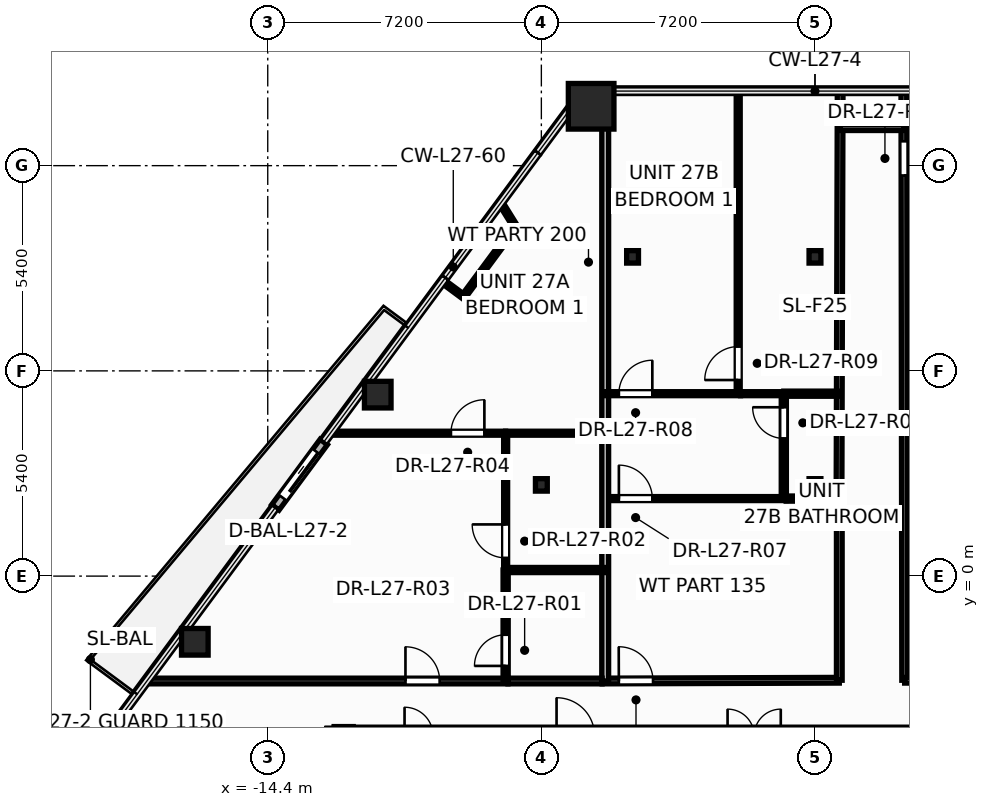
"""IFC4 building model, lengths in metres.
Left out: names, types, materials, properties, quantities, classifications, styles, units other than length and angle.
Written with IfcOpenShell. Run it as: python <this file> out.ifc"""

import sys

from ifc_helpers import new_model, si_unit, direction, frame, frame_2d, origin, origin_2d, place, context, subcontext, project, spatial, rectangle, hollow_rectangle, hollow_circle, i_section, extrude, element, fill, save


model = new_model("IFC4")
c1 = context("Model", 3, precision=1e-05, world=origin(), true_north=direction((0.0, 1.0)))
c2 = subcontext(c1, "Body", "Model", "MODEL_VIEW")
j1 = project(units=[si_unit("LENGTHUNIT", "METRE"), si_unit("PLANEANGLEUNIT", "RADIAN")], contexts=[c1])
p1 = place(None, origin())
s1 = spatial("IfcSite", under=j1, at=p1, CompositionType="ELEMENT")
p2 = place(p1, origin())
s2 = spatial("IfcBuilding", under=s1, at=p2, CompositionType="ELEMENT")
p3 = place(p2, frame((0.0, 0.0, 106.8)))
s3 = spatial("IfcBuildingStorey", under=s2, at=p3, CompositionType="ELEMENT", Elevation=106.8)
p4 = place(p3, frame((-5.89, 12.362, 0.0), z_axis=(0.0, 0.0, 1.0), x_axis=(1.0, 0.0, 0.0)))
e1 = element("IfcColumn", 1, at=p4, inside=s3, PredefinedType="COLUMN", context=c2, shape_type="SweptSolid", body=[
    extrude(hollow_rectangle(XDim=1.2, YDim=1.2, WallThickness=0.055, at=origin_2d()), origin(), (0.0, 0.0, 1.0), 3.6),
])
for number, where, z_axis, x_axis in (
    (2, (-11.506, 4.775, 0.0), (0.0, 0.0, 1.0), (1.0, 0.0, 0.0)),
    (3, (-16.319, -1.729, 0.0), (0.0, 0.0, 1.0), (1.0, 0.0, 0.0)),
):
    element("IfcColumn", number, at=place(p3, frame(where, z_axis=z_axis, x_axis=x_axis)), inside=s3, PredefinedType="COLUMN", context=c2, shape_type="SweptSolid", body=[
        extrude(hollow_circle(Radius=0.35, WallThickness=0.03, at=origin_2d()), origin(), (0.0, 0.0, 1.0), 3.6),
    ])
p5 = place(p3, frame((-12.4, -4.2, 0.0), z_axis=(0.0, 0.0, 1.0), x_axis=(1.0, 0.0, 0.0)))
e4 = element("IfcColumn", 4, at=p5, inside=s3, PredefinedType="COLUMN", context=c2, shape_type="SweptSolid", body=[
    extrude(i_section(OverallWidth=0.5, OverallDepth=0.482, WebThickness=0.04, FlangeThickness=0.045, at=origin_2d()), origin(), (0.0, 0.0, 1.0), 3.6),
])
for number, where, z_axis, x_axis in (
    (5, (-7.2, 2.4, 0.0), (0.0, 0.0, 1.0), (1.0, 0.0, 0.0)),
    (6, (0.0, 2.4, 0.0), (0.0, 0.0, 1.0), (1.0, 0.0, 0.0)),
    (7, (-4.8, 8.4, 0.0), (0.0, 0.0, 1.0), (1.0, 0.0, 0.0)),
    (8, (0.0, 8.4, 0.0), (0.0, 0.0, 1.0), (1.0, 0.0, 0.0)),
):
    element("IfcColumn", number, at=place(p3, frame(where, z_axis=z_axis, x_axis=x_axis)), inside=s3, PredefinedType="COLUMN", context=c2, shape_type="SweptSolid", body=[
        extrude(i_section(OverallWidth=0.311, OverallDepth=0.327, WebThickness=0.016, FlangeThickness=0.025, at=origin_2d()), origin(), (0.0, 0.0, 1.0), 3.6),
    ])
p6 = place(p3, frame((-12.926, 3.528, -0.015), z_axis=(0.0, 0.0, 1.0), x_axis=(-0.594840056707, -0.803844081235, 0.0)))
e9 = element("IfcWall", 9, at=p6, inside=s3, PredefinedType="STANDARD", context=c2, shape_type="SweptSolid", body=[
    extrude(rectangle(XDim=2.14, YDim=0.24, at=frame_2d((1.07, 0.0))), origin(), (0.0, 0.0, 1.0), 2.729),
])
p7 = place(p6, frame((0.32, 0.0, 0.015)))
e10 = element("IfcOpeningElement", 10, at=p7, cuts=e9, PredefinedType="OPENING", context=c2, shape_type="SweptSolid", body=[
    extrude(rectangle(XDim=1.506, YDim=2.204, at=frame_2d((0.75, 1.102))), frame((0.0, 0.13, 0.0), z_axis=(0.0, -1.0, 0.0), x_axis=(1.0, 0.0, 0.0)), (0.0, 0.0, 1.0), 0.26),
])
p8 = place(p3, frame((-12.65, -4.2, 0.0), z_axis=(0.0, 0.0, 1.0), x_axis=(1.0, 0.0, 0.0)))
e11 = element("IfcWall", 11, at=p8, inside=s3, PredefinedType="SHEAR", context=c2, shape_type="SweptSolid", body=[
    extrude(rectangle(XDim=25.3, YDim=0.45, at=frame_2d((12.65, 0.0))), origin(), (0.0, 0.0, 1.0), 3.6),
])
p9 = place(p8, frame((1.85, 0.0, 0.0)))
e12 = element("IfcOpeningElement", 12, at=p9, cuts=e11, PredefinedType="OPENING", context=c2, shape_type="SweptSolid", body=[
    extrude(rectangle(XDim=0.756, YDim=2.054, at=frame_2d((0.375, 1.027))), frame((0.0, 0.235, 0.0), z_axis=(0.0, -1.0, 0.0), x_axis=(1.0, 0.0, 0.0)), (0.0, 0.0, 1.0), 0.47),
])
p10 = place(p8, frame((22.65, 0.0, 0.0)))
e13 = element("IfcOpeningElement", 13, at=p10, cuts=e11, PredefinedType="OPENING", context=c2, shape_type="SweptSolid", body=[
    extrude(rectangle(XDim=0.756, YDim=2.054, at=frame_2d((0.375, 1.027))), frame((0.0, 0.235, 0.0), z_axis=(0.0, -1.0, 0.0), x_axis=(1.0, 0.0, 0.0)), (0.0, 0.0, 1.0), 0.47),
])
p11 = place(p8, frame((5.85, 0.0, 0.0)))
e14 = element("IfcOpeningElement", 14, at=p11, cuts=e11, PredefinedType="OPENING", context=c2, shape_type="SweptSolid", body=[
    extrude(rectangle(XDim=1.006, YDim=2.104, at=frame_2d((0.5, 1.052))), frame((0.0, 0.235, 0.0), z_axis=(0.0, -1.0, 0.0), x_axis=(1.0, 0.0, 0.0)), (0.0, 0.0, 1.0), 0.47),
])
p12 = place(p8, frame((10.35, 0.0, 0.0)))
e15 = element("IfcOpeningElement", 15, at=p12, cuts=e11, PredefinedType="OPENING", context=c2, shape_type="SweptSolid", body=[
    extrude(rectangle(XDim=1.406, YDim=2.154, at=frame_2d((0.7, 1.077))), frame((0.0, 0.235, 0.0), z_axis=(0.0, -1.0, 0.0), x_axis=(1.0, 0.0, 0.0)), (0.0, 0.0, 1.0), 0.47),
])
p13 = place(p8, frame((18.45, 0.0, 0.0)))
e16 = element("IfcOpeningElement", 16, at=p13, cuts=e11, PredefinedType="OPENING", context=c2, shape_type="SweptSolid", body=[
    extrude(rectangle(XDim=1.006, YDim=2.104, at=frame_2d((0.5, 1.052))), frame((0.0, 0.235, 0.0), z_axis=(0.0, -1.0, 0.0), x_axis=(1.0, 0.0, 0.0)), (0.0, 0.0, 1.0), 0.47),
])
p14 = place(p3, frame((2.339, 12.762, 0.0), z_axis=(0.0, 0.0, 1.0), x_axis=(0.001385890916, -0.999999039653, 0.0)))
e17 = element("IfcWall", 17, at=p14, inside=s3, PredefinedType="PARTITIONING", context=c2, shape_type="SweptSolid", body=[
    extrude(rectangle(XDim=15.502, YDim=0.15, at=frame_2d((7.751, 0.0))), origin(), (0.0, 0.0, 1.0), 2.325),
])
p15 = place(p14, frame((1.322, 0.0, 0.0)))
e18 = element("IfcOpeningElement", 18, at=p15, cuts=e17, PredefinedType="OPENING", context=c2, shape_type="SweptSolid", body=[
    extrude(rectangle(XDim=0.906, YDim=2.104, at=frame_2d((0.45, 1.052))), frame((0.0, 0.085, 0.0), z_axis=(0.0, -1.0, 0.0), x_axis=(1.0, 0.0, 0.0)), (0.0, 0.0, 1.0), 0.17),
])
p16 = place(p3, frame((-17.58, -2.76, 0.0), z_axis=(0.0, 0.0, 1.0), x_axis=(1.0, 0.0, 0.0)))
e19 = element("IfcWall", 19, at=p16, inside=s3, PredefinedType="PARTITIONING", context=c2, shape_type="SweptSolid", body=[
    extrude(rectangle(XDim=9.5, YDim=0.15, at=frame_2d((4.75, 0.0))), origin(), (0.0, 0.0, 1.0), 2.713),
])
p17 = place(p16, frame((6.804, 0.0, 0.0)))
e20 = element("IfcOpeningElement", 20, at=p17, cuts=e19, PredefinedType="OPENING", context=c2, shape_type="SweptSolid", body=[
    extrude(rectangle(XDim=0.906, YDim=2.104, at=frame_2d((0.45, 1.052))), frame((0.0, 0.085, 0.0), z_axis=(0.0, -1.0, 0.0), x_axis=(1.0, 0.0, 0.0)), (0.0, 0.0, 1.0), 0.17),
])
p18 = place(p3, frame((0.632, 1.98, 0.0), z_axis=(0.0, 0.0, 1.0), x_axis=(0.002830348232, 0.999995994556, 0.0)))
e21 = element("IfcWall", 21, at=p18, inside=s3, PredefinedType="PARTITIONING", context=c2, shape_type="SweptSolid", body=[
    extrude(rectangle(XDim=10.782, YDim=0.15, at=frame_2d((5.391, 0.0))), origin(), (0.0, 0.0, 1.0), 2.325),
])
p19 = place(p3, frame((-5.52, 3.76, 0.0), z_axis=(0.0, 0.0, 1.0), x_axis=(0.0, 1.0, 0.0)))
e22 = element("IfcWall", 22, at=p19, inside=s3, PredefinedType="PARTITIONING", context=c2, shape_type="SweptSolid", body=[
    extrude(rectangle(XDim=9.002, YDim=0.18, at=frame_2d((4.501, 0.0))), origin(), (0.0, 0.0, 1.0), 2.617),
])
p20 = place(p3, frame((-2.02, 4.8, 0.0), z_axis=(0.0, 0.0, 1.0), x_axis=(0.0, 1.0, 0.0)))
e23 = element("IfcWall", 23, at=p20, inside=s3, PredefinedType="PARTITIONING", context=c2, shape_type="SweptSolid", body=[
    extrude(rectangle(XDim=7.962, YDim=0.105, at=frame_2d((3.981, 0.0))), origin(), (0.0, 0.0, 1.0), 2.617),
])
p21 = place(p20, frame((0.359, 0.0, 0.0)))
e24 = element("IfcOpeningElement", 24, at=p21, cuts=e23, PredefinedType="OPENING", context=c2, shape_type="SweptSolid", body=[
    extrude(rectangle(XDim=0.886, YDim=2.104, at=frame_2d((0.44, 1.052))), frame((0.0, 0.062, 0.0), z_axis=(0.0, -1.0, 0.0), x_axis=(1.0, 0.0, 0.0)), (0.0, 0.0, 1.0), 0.125),
])
p22 = place(p3, frame((-5.6, -2.76, 0.0), z_axis=(0.0, 0.0, 1.0), x_axis=(0.999994853563, 0.003208246723, 0.0)))
e25 = element("IfcWall", 25, at=p22, inside=s3, PredefinedType="PARTITIONING", context=c2, shape_type="SweptSolid", body=[
    extrude(rectangle(XDim=6.24, YDim=0.15, at=frame_2d((3.12, 0.0))), origin(), (0.0, 0.0, 1.0), 2.325),
])
p23 = place(p22, frame((0.439, 0.0, 0.0)))
e26 = element("IfcOpeningElement", 26, at=p23, cuts=e25, PredefinedType="OPENING", context=c2, shape_type="SweptSolid", body=[
    extrude(rectangle(XDim=0.906, YDim=2.104, at=frame_2d((0.45, 1.052))), frame((0.0, 0.085, 0.0), z_axis=(0.0, -1.0, 0.0), x_axis=(1.0, 0.0, 0.0)), (0.0, 0.0, 1.0), 0.17),
])
p24 = place(p3, frame((0.64, -2.74, 0.0), z_axis=(0.0, 0.0, 1.0), x_axis=(0.0, 1.0, 0.0)))
e27 = element("IfcWall", 27, at=p24, inside=s3, PredefinedType="PARTITIONING", context=c2, shape_type="SweptSolid", body=[
    extrude(rectangle(XDim=4.718, YDim=0.15, at=frame_2d((2.359, 0.0))), origin(), (0.0, 0.0, 1.0), 3.35),
])
p25 = place(p3, frame((-5.52, 2.04, 0.0), z_axis=(0.0, 0.0, 1.0), x_axis=(1.0, 0.0, 0.0)))
e28 = element("IfcWall", 28, at=p25, inside=s3, PredefinedType="PARTITIONING", context=c2, shape_type="SweptSolid", body=[
    extrude(rectangle(XDim=4.76, YDim=0.105, at=frame_2d((2.38, 0.0))), origin(), (0.0, 0.0, 1.0), 2.918),
])
p26 = place(p25, frame((0.36, 0.0, 0.0)))
e29 = element("IfcOpeningElement", 29, at=p26, cuts=e28, PredefinedType="OPENING", context=c2, shape_type="SweptSolid", body=[
    extrude(rectangle(XDim=0.886, YDim=2.104, at=frame_2d((0.44, 1.052))), frame((0.0, 0.062, 0.0), z_axis=(0.0, -1.0, 0.0), x_axis=(1.0, 0.0, 0.0)), (0.0, 0.0, 1.0), 0.125),
])
p27 = place(p3, frame((2.36, -2.74, 0.0), z_axis=(0.0, 0.0, 1.0), x_axis=(0.999991056007, -0.0042294097, 0.0)))
e30 = element("IfcWall", 30, at=p27, inside=s3, PredefinedType="PARTITIONING", context=c2, shape_type="SweptSolid", body=[
    extrude(rectangle(XDim=4.618, YDim=0.15, at=frame_2d((2.309, 0.0))), origin(), (0.0, 0.0, 1.0), 2.918),
])
p28 = place(p3, frame((-12.754, 3.76, 0.0), z_axis=(0.0, 0.0, 1.0), x_axis=(1.0, 0.0, 0.0)))
e31 = element("IfcWall", 31, at=p28, inside=s3, PredefinedType="PARTITIONING", context=c2, shape_type="SweptSolid", body=[
    extrude(rectangle(XDim=4.615, YDim=0.105, at=frame_2d((2.307, 0.0))), origin(), (0.0, 0.0, 1.0), 2.713),
])
p29 = place(p28, frame((3.175, 0.0, 0.0)))
e32 = element("IfcOpeningElement", 32, at=p29, cuts=e31, PredefinedType="OPENING", context=c2, shape_type="SweptSolid", body=[
    extrude(rectangle(XDim=0.886, YDim=2.104, at=frame_2d((0.44, 1.052))), frame((0.0, 0.062, 0.0), z_axis=(0.0, -1.0, 0.0), x_axis=(1.0, 0.0, 0.0)), (0.0, 0.0, 1.0), 0.125),
])
p30 = place(p3, frame((-8.14, 0.16, 0.0), z_axis=(0.0, 0.0, 1.0), x_axis=(0.0, 1.0, 0.0)))
e33 = element("IfcWall", 33, at=p30, inside=s3, PredefinedType="PARTITIONING", context=c2, shape_type="SweptSolid", body=[
    extrude(rectangle(XDim=3.6, YDim=0.105, at=frame_2d((1.8, 0.0))), origin(), (0.0, 0.0, 1.0), 2.617),
])
p31 = place(p30, frame((0.32, 0.0, 0.0)))
e34 = element("IfcOpeningElement", 34, at=p31, cuts=e33, PredefinedType="OPENING", context=c2, shape_type="SweptSolid", body=[
    extrude(rectangle(XDim=0.886, YDim=2.104, at=frame_2d((0.44, 1.052))), frame((0.0, 0.062, 0.0), z_axis=(0.0, -1.0, 0.0), x_axis=(1.0, 0.0, 0.0)), (0.0, 0.0, 1.0), 0.125),
])
p32 = place(p3, frame((-5.52, 4.8, 0.0), z_axis=(0.0, 0.0, 1.0), x_axis=(1.0, 0.0, 0.0)))
e35 = element("IfcWall", 35, at=p32, inside=s3, PredefinedType="PARTITIONING", context=c2, shape_type="SweptSolid", body=[
    extrude(rectangle(XDim=3.56, YDim=0.105, at=frame_2d((1.78, 0.0))), origin(), (0.0, 0.0, 1.0), 2.918),
])
p33 = place(p32, frame((0.36, 0.0, 0.0)))
e36 = element("IfcOpeningElement", 36, at=p33, cuts=e35, PredefinedType="OPENING", context=c2, shape_type="SweptSolid", body=[
    extrude(rectangle(XDim=0.886, YDim=2.104, at=frame_2d((0.44, 1.052))), frame((0.0, 0.062, 0.0), z_axis=(0.0, -1.0, 0.0), x_axis=(1.0, 0.0, 0.0)), (0.0, 0.0, 1.0), 0.125),
])
p34 = place(p3, frame((-8.14, -2.76, 0.0), z_axis=(0.0, 0.0, 1.0), x_axis=(0.0, 1.0, 0.0)))
e37 = element("IfcWall", 37, at=p34, inside=s3, PredefinedType="PARTITIONING", context=c2, shape_type="SweptSolid", body=[
    extrude(rectangle(XDim=2.92, YDim=0.135, at=frame_2d((1.46, 0.0))), origin(), (0.0, 0.0, 1.0), 3.35),
])
p35 = place(p34, frame((0.397, 0.0, 0.0)))
e38 = element("IfcOpeningElement", 38, at=p35, cuts=e37, PredefinedType="OPENING", context=c2, shape_type="SweptSolid", body=[
    extrude(rectangle(XDim=0.826, YDim=2.104, at=frame_2d((0.41, 1.052))), frame((0.0, 0.078, 0.0), z_axis=(0.0, -1.0, 0.0), x_axis=(1.0, 0.0, 0.0)), (0.0, 0.0, 1.0), 0.155),
])
p36 = place(p3, frame((-5.52, -2.76, 0.0), z_axis=(0.0, 0.0, 1.0), x_axis=(0.0, 1.0, 0.0)))
e39 = element("IfcWall", 39, at=p36, inside=s3, PredefinedType="PARTITIONING", context=c2, shape_type="SweptSolid", body=[
    extrude(rectangle(XDim=6.52, YDim=0.18, at=frame_2d((3.26, 0.0))), origin(), (0.0, 0.0, 1.0), 2.325),
])
p37 = place(p3, frame((-0.82, 2.04, 0.0), z_axis=(0.0, 0.0, 1.0), x_axis=(0.0, 1.0, 0.0)))
e40 = element("IfcWall", 40, at=p37, inside=s3, PredefinedType="PARTITIONING", context=c2, shape_type="SweptSolid", body=[
    extrude(rectangle(XDim=2.76, YDim=0.135, at=frame_2d((1.38, 0.0))), origin(), (0.0, 0.0, 1.0), 2.325),
])
p38 = place(p37, frame((1.583, 0.0, 0.0)))
e41 = element("IfcOpeningElement", 41, at=p38, cuts=e40, PredefinedType="OPENING", context=c2, shape_type="SweptSolid", body=[
    extrude(rectangle(XDim=0.826, YDim=2.104, at=frame_2d((0.41, 1.052))), frame((0.0, 0.078, 0.0), z_axis=(0.0, -1.0, 0.0), x_axis=(1.0, 0.0, 0.0)), (0.0, 0.0, 1.0), 0.155),
])
p39 = place(p3, frame((-8.078, -2.76, 0.0), z_axis=(0.0, 0.0, 1.0), x_axis=(1.0, 0.0, 0.0)))
e42 = element("IfcWall", 42, at=p39, inside=s3, PredefinedType="PARTITIONING", context=c2, shape_type="SweptSolid", body=[
    extrude(rectangle(XDim=2.476, YDim=0.15, at=frame_2d((1.238, 0.0))), origin(), (0.0, 0.0, 1.0), 2.325),
])
p40 = place(p3, frame((-8.14, 0.16, 0.0), z_axis=(0.0, 0.0, 1.0), x_axis=(1.0, 0.0, 0.0)))
e43 = element("IfcWall", 43, at=p40, inside=s3, PredefinedType="PARTITIONING", context=c2, shape_type="SweptSolid", body=[
    extrude(rectangle(XDim=2.62, YDim=0.135, at=frame_2d((1.31, 0.0))), origin(), (0.0, 0.0, 1.0), 2.325),
])
p41 = place(p3, frame((-8.14, 3.76, 0.0), z_axis=(0.0, 0.0, 1.0), x_axis=(1.0, 0.0, 0.0)))
e44 = element("IfcWall", 44, at=p41, inside=s3, PredefinedType="PARTITIONING", context=c2, shape_type="SweptSolid", body=[
    extrude(rectangle(XDim=2.62, YDim=0.105, at=frame_2d((1.31, 0.0))), origin(), (0.0, 0.0, 1.0), 2.617),
])
p42 = place(p3, frame((-7.884, 9.198, 0.0), z_axis=(0.0, 0.0, 1.0), x_axis=(-0.594914508596, -0.803788981924, 0.0)))
e45 = element("IfcWall", 45, at=p42, inside=s3, PredefinedType="PARTITIONING", context=c2, shape_type="SweptSolid", body=[
    extrude(rectangle(XDim=2.294, YDim=0.12, at=frame_2d((1.147, 0.0))), origin(), (0.0, 0.0, 1.0), 3.35),
])
p43 = place(p3, frame((-0.758, 2.04, 0.0), z_axis=(0.0, 0.0, 1.0), x_axis=(1.0, 0.0, 0.0)))
e46 = element("IfcWall", 46, at=p43, inside=s3, PredefinedType="PARTITIONING", context=c2, shape_type="SweptSolid", body=[
    extrude(rectangle(XDim=1.398, YDim=0.135, at=frame_2d((0.699, 0.0))), origin(), (0.0, 0.0, 1.0), 2.325),
])
p44 = place(p3, frame((-0.82, 4.8, 0.0), z_axis=(0.0, 0.0, 1.0), x_axis=(1.0, 0.0, 0.0)))
e47 = element("IfcWall", 47, at=p44, inside=s3, PredefinedType="PARTITIONING", context=c2, shape_type="SweptSolid", body=[
    extrude(rectangle(XDim=1.46, YDim=0.135, at=frame_2d((0.73, 0.0))), origin(), (0.0, 0.0, 1.0), 2.325),
])
p45 = place(p3, frame((-1.958, 4.8, 0.0), z_axis=(0.0, 0.0, 1.0), x_axis=(1.0, 0.0, 0.0)))
e48 = element("IfcWall", 48, at=p45, inside=s3, PredefinedType="PARTITIONING", context=c2, shape_type="SweptSolid", body=[
    extrude(rectangle(XDim=1.138, YDim=0.105, at=frame_2d((0.569, 0.0))), origin(), (0.0, 0.0, 1.0), 3.35),
])
p46 = place(p3, frame((0.66, 11.8, 0.0), z_axis=(0.0, 0.0, 1.0), x_axis=(1.0, 0.0, 0.0)))
e49 = element("IfcWall", 49, at=p46, inside=s3, PredefinedType="PARTITIONING", context=c2, shape_type="SweptSolid", body=[
    extrude(rectangle(XDim=1.68, YDim=0.15, at=frame_2d((0.84, 0.0))), origin(), (0.0, 0.0, 1.0), 3.35),
])
p47 = place(p3, frame((-8.264, 9.81, 0.0), z_axis=(0.0, 0.0, 1.0), x_axis=(0.528079385195, -0.849195008777, 0.0)))
e50 = element("IfcWall", 50, at=p47, inside=s3, PredefinedType="PARTITIONING", context=c2, shape_type="SweptSolid", body=[
    extrude(rectangle(XDim=0.721, YDim=0.12, at=frame_2d((0.36, 0.0))), origin(), (0.0, 0.0, 1.0), 2.713),
])
p48 = place(p3, frame((-9.249, 7.353, 0.0), z_axis=(0.0, 0.0, 1.0), x_axis=(-0.803744328022, 0.594974835748, 0.0)))
e51 = element("IfcWall", 51, at=p48, inside=s3, PredefinedType="PARTITIONING", context=c2, shape_type="SweptSolid", body=[
    extrude(rectangle(XDim=0.67, YDim=0.12, at=frame_2d((0.335, 0.0))), origin(), (0.0, 0.0, 1.0), 2.713),
])
p49 = place(p7, origin())
e52 = element("IfcDoor", 52, at=p49, inside=s3, OperationType="SLIDING_TO_RIGHT", PredefinedType="DOOR", context=c2, shape_type="SweptSolid", body=[
    extrude(rectangle(XDim=1.5, YDim=2.2, at=frame_2d((0.75, 1.1))), frame((0.0, 0.025, 0.0), z_axis=(0.0, -1.0, 0.0), x_axis=(1.0, 0.0, 0.0)), (0.0, 0.0, 1.0), 0.05),
])
fill(e10, e52)
p50 = place(p35, origin())
e53 = element("IfcDoor", 53, at=p50, inside=s3, OperationType="SINGLE_SWING_LEFT", PredefinedType="DOOR", context=c2, shape_type="SweptSolid", body=[
    extrude(rectangle(XDim=0.82, YDim=2.1, at=frame_2d((0.41, 1.05))), frame((0.0, 0.025, 0.0), z_axis=(0.0, -1.0, 0.0), x_axis=(1.0, 0.0, 0.0)), (0.0, 0.0, 1.0), 0.05),
])
fill(e38, e53)
p51 = place(p31, origin())
e54 = element("IfcDoor", 54, at=p51, inside=s3, OperationType="SINGLE_SWING_RIGHT", PredefinedType="DOOR", context=c2, shape_type="SweptSolid", body=[
    extrude(rectangle(XDim=0.88, YDim=2.1, at=frame_2d((0.44, 1.05))), frame((0.0, 0.025, 0.0), z_axis=(0.0, -1.0, 0.0), x_axis=(1.0, 0.0, 0.0)), (0.0, 0.0, 1.0), 0.05),
])
fill(e34, e54)
p52 = place(p17, origin())
e55 = element("IfcDoor", 55, at=p52, inside=s3, OperationType="SINGLE_SWING_LEFT", PredefinedType="DOOR", context=c2, shape_type="SweptSolid", body=[
    extrude(rectangle(XDim=0.9, YDim=2.1, at=frame_2d((0.45, 1.05))), frame((0.0, 0.025, 0.0), z_axis=(0.0, -1.0, 0.0), x_axis=(1.0, 0.0, 0.0)), (0.0, 0.0, 1.0), 0.05),
])
fill(e20, e55)
p53 = place(p29, origin())
e56 = element("IfcDoor", 56, at=p53, inside=s3, OperationType="SINGLE_SWING_RIGHT", PredefinedType="DOOR", context=c2, shape_type="SweptSolid", body=[
    extrude(rectangle(XDim=0.88, YDim=2.1, at=frame_2d((0.44, 1.05))), frame((0.0, 0.025, 0.0), z_axis=(0.0, -1.0, 0.0), x_axis=(1.0, 0.0, 0.0)), (0.0, 0.0, 1.0), 0.05),
])
fill(e32, e56)
p54 = place(p23, origin())
e57 = element("IfcDoor", 57, at=p54, inside=s3, OperationType="SINGLE_SWING_LEFT", PredefinedType="DOOR", context=c2, shape_type="SweptSolid", body=[
    extrude(rectangle(XDim=0.9, YDim=2.1, at=frame_2d((0.45, 1.05))), frame((0.0, 0.025, 0.0), z_axis=(0.0, -1.0, 0.0), x_axis=(1.0, 0.0, 0.0)), (0.0, 0.0, 1.0), 0.05),
])
fill(e26, e57)
p55 = place(p38, origin())
e58 = element("IfcDoor", 58, at=p55, inside=s3, OperationType="SINGLE_SWING_RIGHT", PredefinedType="DOOR", context=c2, shape_type="SweptSolid", body=[
    extrude(rectangle(XDim=0.82, YDim=2.1, at=frame_2d((0.41, 1.05))), frame((0.0, 0.025, 0.0), z_axis=(0.0, -1.0, 0.0), x_axis=(1.0, 0.0, 0.0)), (0.0, 0.0, 1.0), 0.05),
])
fill(e41, e58)
p56 = place(p26, origin())
e59 = element("IfcDoor", 59, at=p56, inside=s3, OperationType="SINGLE_SWING_LEFT", PredefinedType="DOOR", context=c2, shape_type="SweptSolid", body=[
    extrude(rectangle(XDim=0.88, YDim=2.1, at=frame_2d((0.44, 1.05))), frame((0.0, 0.025, 0.0), z_axis=(0.0, -1.0, 0.0), x_axis=(1.0, 0.0, 0.0)), (0.0, 0.0, 1.0), 0.05),
])
fill(e29, e59)
p57 = place(p33, origin())
e60 = element("IfcDoor", 60, at=p57, inside=s3, OperationType="SINGLE_SWING_RIGHT", PredefinedType="DOOR", context=c2, shape_type="SweptSolid", body=[
    extrude(rectangle(XDim=0.88, YDim=2.1, at=frame_2d((0.44, 1.05))), frame((0.0, 0.025, 0.0), z_axis=(0.0, -1.0, 0.0), x_axis=(1.0, 0.0, 0.0)), (0.0, 0.0, 1.0), 0.05),
])
fill(e36, e60)
p58 = place(p21, origin())
e61 = element("IfcDoor", 61, at=p58, inside=s3, OperationType="SINGLE_SWING_LEFT", PredefinedType="DOOR", context=c2, shape_type="SweptSolid", body=[
    extrude(rectangle(XDim=0.88, YDim=2.1, at=frame_2d((0.44, 1.05))), frame((0.0, 0.025, 0.0), z_axis=(0.0, -1.0, 0.0), x_axis=(1.0, 0.0, 0.0)), (0.0, 0.0, 1.0), 0.05),
])
fill(e24, e61)
p59 = place(p15, origin())
e62 = element("IfcDoor", 62, at=p59, inside=s3, OperationType="SINGLE_SWING_RIGHT", PredefinedType="DOOR", context=c2, shape_type="SweptSolid", body=[
    extrude(rectangle(XDim=0.9, YDim=2.1, at=frame_2d((0.45, 1.05))), frame((0.0, 0.025, 0.0), z_axis=(0.0, -1.0, 0.0), x_axis=(1.0, 0.0, 0.0)), (0.0, 0.0, 1.0), 0.05),
])
fill(e18, e62)
save(model, sys.argv[1])
